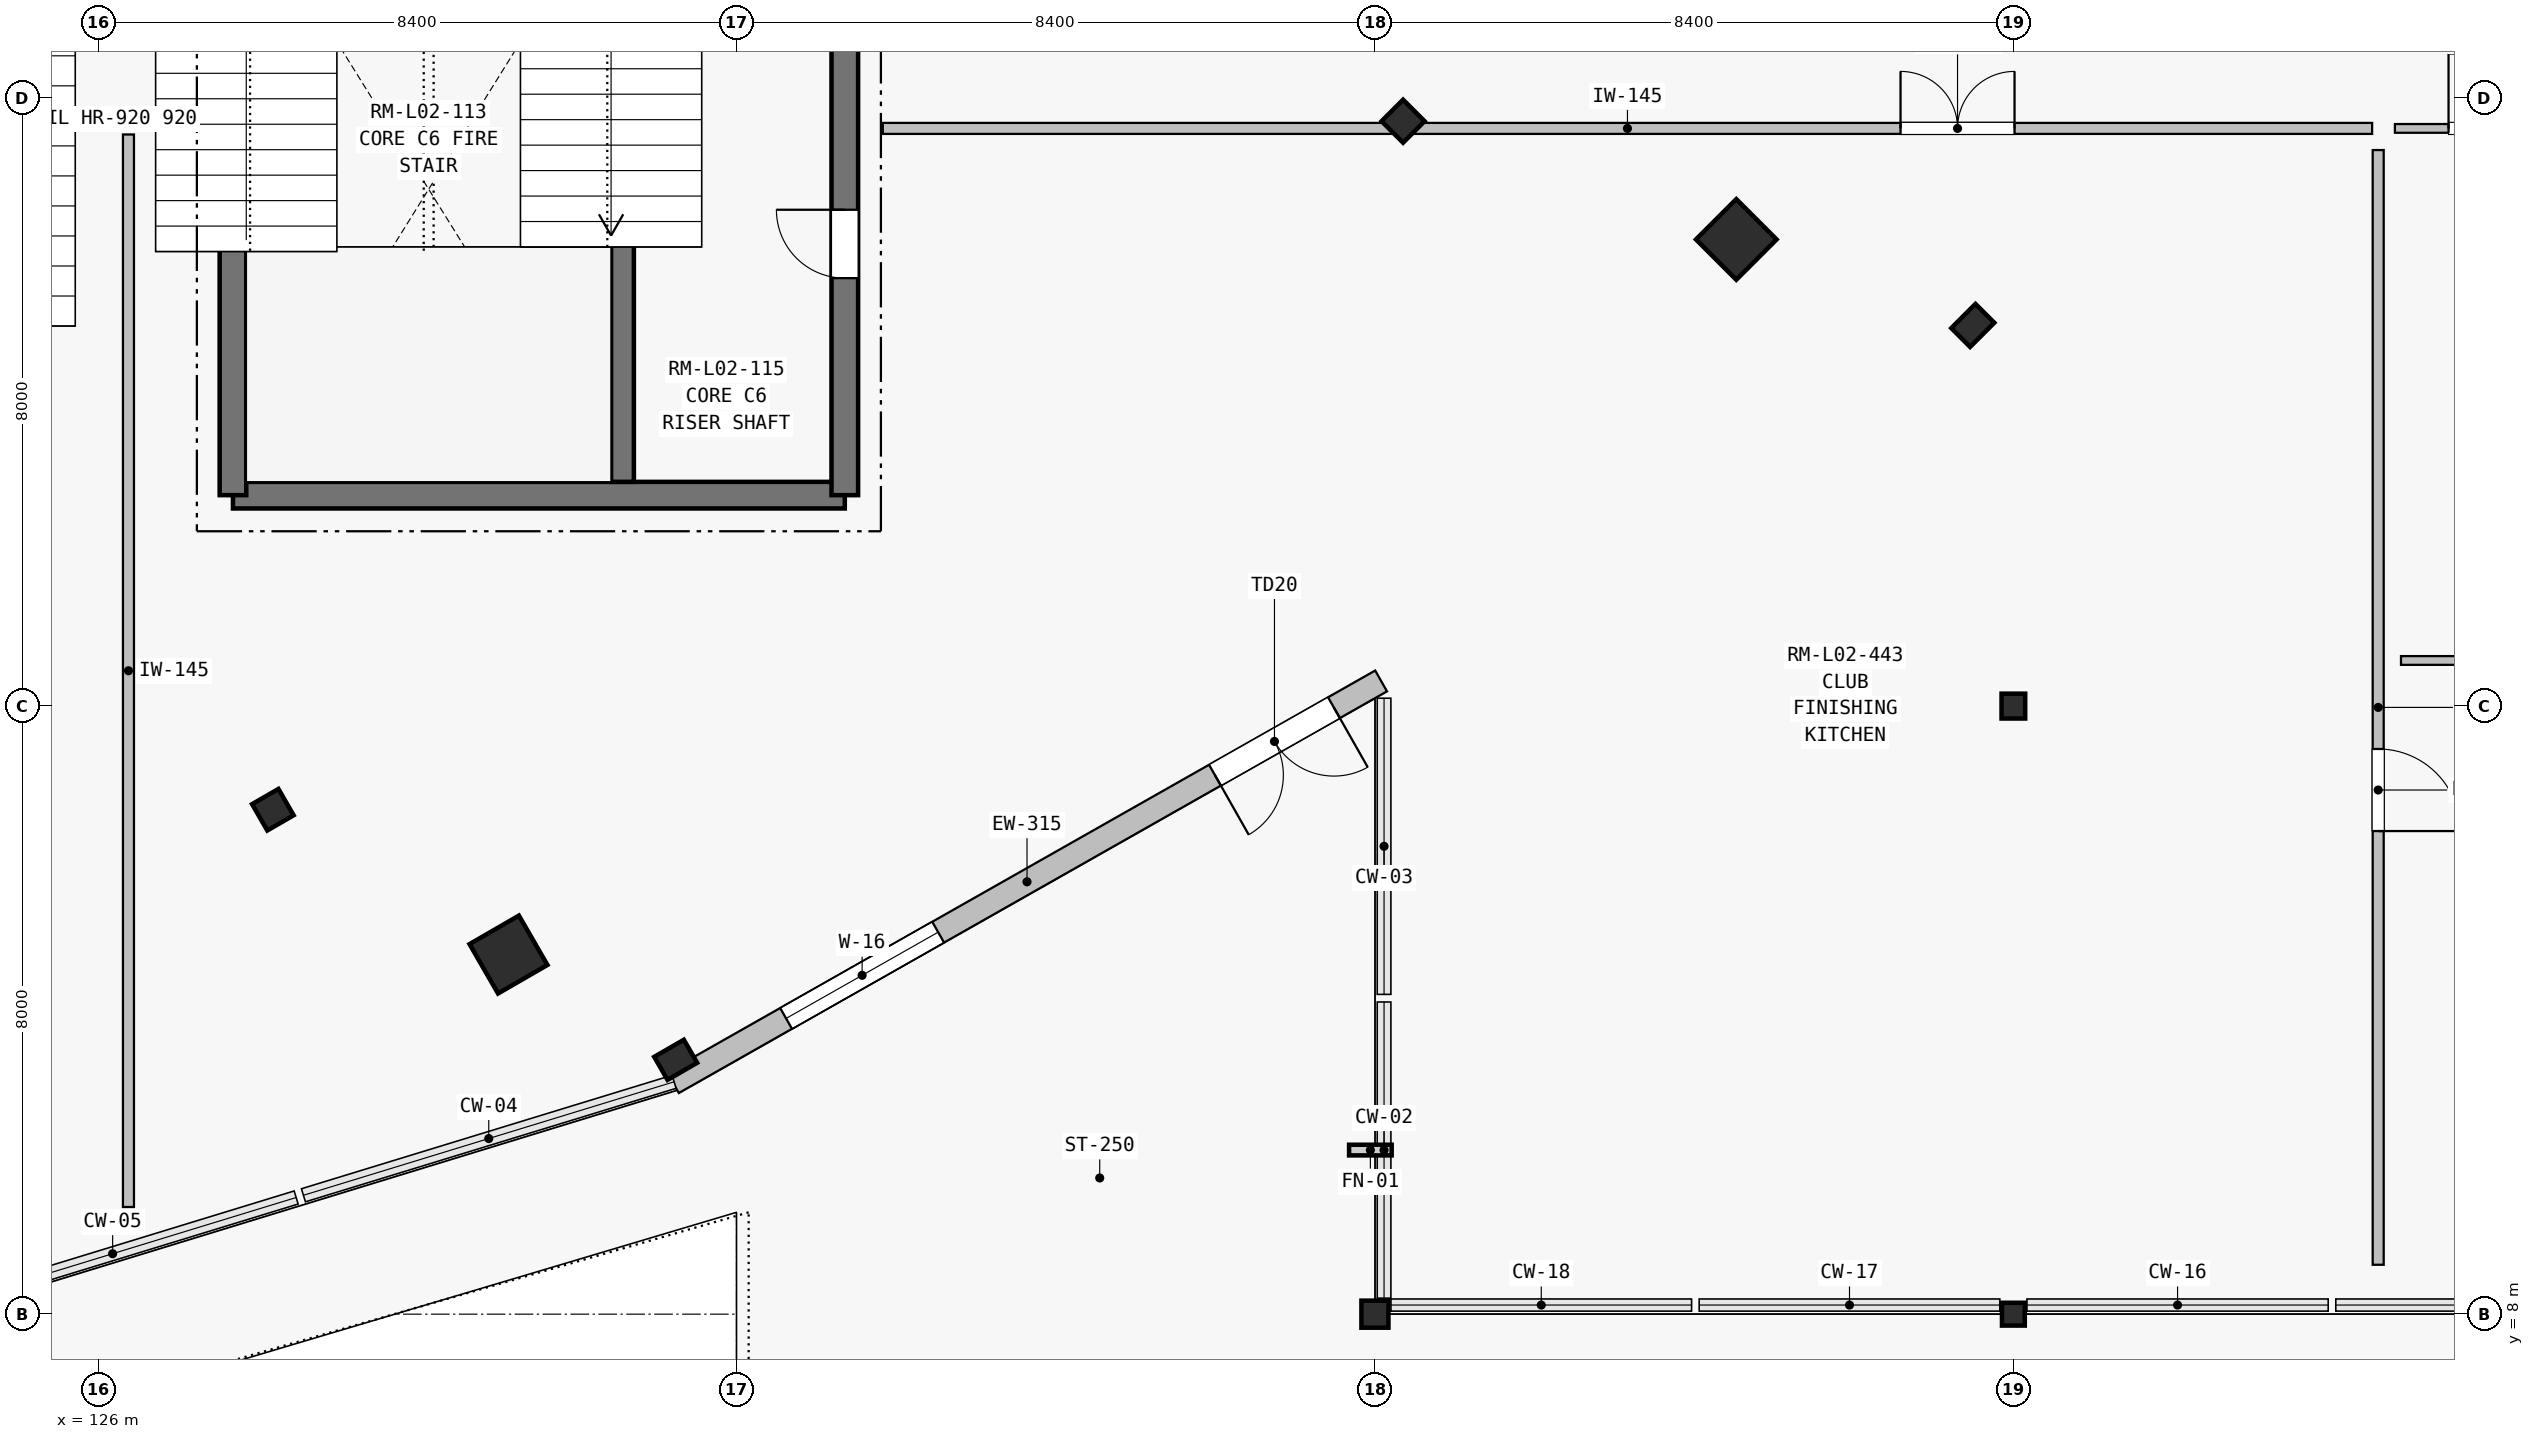
"""IFC4 building model, lengths in metres.
Left out: names, types, materials, properties, quantities, classifications, styles, units other than length and angle.
Written with IfcOpenShell. Run it as: python <this file> out.ifc"""

import sys

from ifc_helpers import new_model, si_unit, direction, frame, frame_2d, origin, origin_2d, place, context, subcontext, project, spatial, rectangle, hollow_rectangle, hollow_circle, i_section, extrude, element, fill, save


model = new_model("IFC4")
c1 = context("Model", 3, precision=1e-05, world=origin(), true_north=direction((0.0, 1.0)))
c2 = subcontext(c1, "Body", "Model", "MODEL_VIEW")
j1 = project(units=[si_unit("LENGTHUNIT", "METRE"), si_unit("PLANEANGLEUNIT", "RADIAN")], contexts=[c1])
p1 = place(None, origin())
s1 = spatial("IfcSite", under=j1, at=p1, CompositionType="ELEMENT")
p2 = place(p1, origin())
s2 = spatial("IfcBuilding", under=s1, at=p2, CompositionType="ELEMENT")
p3 = place(p2, frame((0.0, 0.0, 9.9)))
s3 = spatial("IfcBuildingStorey", under=s2, at=p3, CompositionType="ELEMENT", Elevation=9.9)
for number, where, z_axis, x_axis in (
    (1, (128.3, 14.637, 0.0), (0.0, 0.0, 1.0), (0.5, -0.866, 0.0)),
    (2, (143.17, 23.695, 0.0), (0.0, 0.0, 1.0), (0.707, -0.707, 0.0)),
):
    element("IfcColumn", number, at=place(p3, frame(where, z_axis=z_axis, x_axis=x_axis)), inside=s3, PredefinedType="COLUMN", context=c2, shape_type="SweptSolid", body=[
        extrude(i_section(OverallWidth=0.4, OverallDepth=0.4, WebThickness=0.016, FlangeThickness=0.028, at=origin_2d()), origin(), (0.0, 0.0, 1.0), 4.5),
    ])
for number, where, z_axis, x_axis in (
    (3, (131.4, 12.731, 0.0), (0.0, 0.0, 1.0), (0.5, -0.866, 0.0)),
    (4, (147.554, 22.139, 0.0), (0.0, 0.0, 1.0), (0.707, -0.707, 0.0)),
):
    element("IfcColumn", number, at=place(p3, frame(where, z_axis=z_axis, x_axis=x_axis)), inside=s3, PredefinedType="COLUMN", context=c2, shape_type="SweptSolid", body=[
        extrude(rectangle(XDim=0.75, YDim=0.75, at=origin_2d()), origin(), (0.0, 0.0, 1.0), 4.5),
    ])
p4 = place(p3, frame((142.8, 8.0, 0.0), z_axis=(0.0, 0.0, 1.0), x_axis=(1.0, 0.0, 0.0)))
e5 = element("IfcColumn", 5, at=p4, inside=s3, PredefinedType="COLUMN", context=c2, shape_type="SweptSolid", body=[
    extrude(hollow_circle(Radius=0.178, WallThickness=0.013, at=origin_2d()), origin(), (0.0, 0.0, 1.0), 4.26),
])
p5 = place(p3, frame((151.2, 8.0, 0.0), z_axis=(0.0, 0.0, 1.0), x_axis=(1.0, 0.0, 0.0)))
e6 = element("IfcColumn", 6, at=p5, inside=s3, PredefinedType="COLUMN", context=c2, shape_type="SweptSolid", body=[
    extrude(hollow_rectangle(XDim=0.3, YDim=0.3, WallThickness=0.012, at=origin_2d()), origin(), (0.0, 0.0, 1.0), 4.26),
])
p6 = place(p3, frame((151.2, 16.0, 0.0), z_axis=(0.0, 0.0, 1.0), x_axis=(1.0, 0.0, 0.0)))
e7 = element("IfcColumn", 7, at=p6, inside=s3, PredefinedType="COLUMN", context=c2, shape_type="SweptSolid", body=[
    extrude(i_section(OverallWidth=0.311, OverallDepth=0.327, WebThickness=0.016, FlangeThickness=0.025, at=origin_2d()), origin(), (0.0, 0.0, 1.0), 4.26),
])
for number, where, z_axis, x_axis in (
    (8, (133.6, 11.346, 0.0), (0.0, 0.0, 1.0), (0.5, -0.866, 0.0)),
    (9, (150.666, 21.008, 0.0), (0.0, 0.0, 1.0), (0.707, -0.707, 0.0)),
):
    element("IfcColumn", number, at=place(p3, frame(where, z_axis=z_axis, x_axis=x_axis)), inside=s3, PredefinedType="PILASTER", context=c2, shape_type="SweptSolid", body=[
        extrude(rectangle(XDim=0.35, YDim=0.45, at=origin_2d()), origin(), (0.0, 0.0, 1.0), 5.45),
    ])
p7 = place(p3, frame((142.881, 16.331, 0.0), z_axis=(0.0, 0.0, 1.0), x_axis=(-0.869834750278, -0.493343194144, 0.0)))
e10 = element("IfcWall", 10, at=p7, inside=s3, PredefinedType="SOLIDWALL", context=c2, shape_type="SweptSolid", body=[
    extrude(rectangle(XDim=10.712, YDim=0.315, at=frame_2d((5.356, 0.0))), origin(), (0.0, 0.0, 1.0), 4.26),
])
p8 = place(p7, frame((0.713, 0.0, 0.0)))
e11 = element("IfcOpeningElement", 11, at=p8, cuts=e10, PredefinedType="OPENING", context=c2, shape_type="SweptSolid", body=[
    extrude(rectangle(XDim=1.8, YDim=2.35, at=frame_2d((0.9, 1.175))), frame((0.0, 0.167, 0.0), z_axis=(0.0, -1.0, 0.0), x_axis=(1.0, 0.0, 0.0)), (0.0, 0.0, 1.0), 0.335),
])
p9 = place(p7, frame((6.7, 0.0, 0.9)))
e12 = element("IfcOpeningElement", 12, at=p9, cuts=e10, PredefinedType="OPENING", context=c2, shape_type="SweptSolid", body=[
    extrude(rectangle(XDim=2.3, YDim=1.3, at=frame_2d((1.15, 0.65))), frame((0.0, 0.167, 0.0), z_axis=(0.0, -1.0, 0.0), x_axis=(1.0, 0.0, 0.0)), (0.0, 0.0, 1.0), 0.335),
])
p10 = place(p3, frame((127.775, 18.775, 0.0), z_axis=(0.0, 0.0, 1.0), x_axis=(1.0, 0.0, 0.0)))
e13 = element("IfcWall", 13, at=p10, inside=s3, PredefinedType="SHEAR", context=c2, shape_type="SweptSolid", body=[
    extrude(rectangle(XDim=8.05, YDim=0.35, at=frame_2d((4.025, 0.0))), origin(), (0.0, 0.0, 1.0), 4.5),
])
p11 = place(p3, frame((127.775, 18.775, 0.0), z_axis=(0.0, 0.0, 1.0), x_axis=(0.0, 1.0, 0.0)))
e14 = element("IfcWall", 14, at=p11, inside=s3, PredefinedType="SHEAR", context=c2, shape_type="SweptSolid", body=[
    extrude(rectangle(XDim=14.85, YDim=0.35, at=frame_2d((7.425, 0.0))), origin(), (0.0, 0.0, 1.0), 4.5),
])
p12 = place(p3, frame((135.825, 18.775, 0.0), z_axis=(0.0, 0.0, 1.0), x_axis=(0.0, 1.0, 0.0)))
e15 = element("IfcWall", 15, at=p12, inside=s3, PredefinedType="SHEAR", context=c2, shape_type="SweptSolid", body=[
    extrude(rectangle(XDim=14.85, YDim=0.35, at=frame_2d((7.425, 0.0))), origin(), (0.0, 0.0, 1.0), 4.5),
])
p13 = place(p12, frame((2.855, 0.0, 0.0)))
e16 = element("IfcOpeningElement", 16, at=p13, cuts=e15, PredefinedType="OPENING", context=c2, shape_type="SweptSolid", body=[
    extrude(rectangle(XDim=0.9, YDim=2.1, at=frame_2d((0.45, 1.05))), frame((0.0, 0.185, 0.0), z_axis=(0.0, -1.0, 0.0), x_axis=(1.0, 0.0, 0.0)), (0.0, 0.0, 1.0), 0.37),
])
p14 = place(p3, frame((132.9, 18.95, 0.0), z_axis=(0.0, 0.0, 1.0), x_axis=(0.0, 1.0, 0.0)))
e17 = element("IfcWall", 17, at=p14, inside=s3, PredefinedType="SHEAR", context=c2, shape_type="SweptSolid", body=[
    extrude(rectangle(XDim=10.35, YDim=0.3, at=frame_2d((5.175, 0.0))), origin(), (0.0, 0.0, 1.0), 4.5),
])
p15 = place(p3, frame((136.325, 23.6, 0.0), z_axis=(0.0, 0.0, 1.0), x_axis=(1.0, 0.0, 0.0)))
e18 = element("IfcWall", 18, at=p15, inside=s3, PredefinedType="PARTITIONING", context=c2, shape_type="SweptSolid", body=[
    extrude(rectangle(XDim=19.595, YDim=0.145, at=frame_2d((9.797, 0.0))), origin(), (0.0, 0.0, 1.0), 3.245),
])
p16 = place(p15, frame((13.39, 0.0, 0.0)))
e19 = element("IfcOpeningElement", 19, at=p16, cuts=e18, PredefinedType="OPENING", context=c2, shape_type="SweptSolid", body=[
    extrude(rectangle(XDim=1.5, YDim=2.2, at=frame_2d((0.75, 1.1))), frame((0.0, 0.083, 0.0), z_axis=(0.0, -1.0, 0.0), x_axis=(1.0, 0.0, 0.0)), (0.0, 0.0, 1.0), 0.165),
])
p17 = place(p3, frame((156.0, 23.315, 0.0), z_axis=(0.0, 0.0, 1.0), x_axis=(0.0, -1.0, 0.0)))
e20 = element("IfcWall", 20, at=p17, inside=s3, PredefinedType="PARTITIONING", context=c2, shape_type="SweptSolid", body=[
    extrude(rectangle(XDim=14.665, YDim=0.145, at=frame_2d((7.333, 0.0))), origin(), (0.0, 0.0, 1.0), 3.325),
])
p18 = place(p17, frame((7.879, 0.0, 0.0)))
e21 = element("IfcOpeningElement", 21, at=p18, cuts=e20, PredefinedType="OPENING", context=c2, shape_type="SweptSolid", body=[
    extrude(rectangle(XDim=1.08, YDim=2.15, at=frame_2d((0.54, 1.075))), frame((0.0, 0.083, 0.0), z_axis=(0.0, -1.0, 0.0), x_axis=(1.0, 0.0, 0.0)), (0.0, 0.0, 1.0), 0.165),
])
p19 = place(p3, frame((126.4, 9.41, 0.0), z_axis=(0.0, 0.0, 1.0), x_axis=(0.0, 1.0, 0.0)))
e22 = element("IfcWall", 22, at=p19, inside=s3, PredefinedType="PARTITIONING", context=c2, shape_type="SweptSolid", body=[
    extrude(rectangle(XDim=14.11, YDim=0.145, at=frame_2d((7.055, 0.0))), origin(), (0.0, 0.0, 1.0), 3.245),
])
p20 = place(p3, frame((156.3, 16.6, 0.0), z_axis=(0.0, 0.0, 1.0), x_axis=(1.0, 0.0, 0.0)))
e23 = element("IfcWall", 23, at=p20, inside=s3, PredefinedType="PARTITIONING", context=c2, shape_type="SweptSolid", body=[
    extrude(rectangle(XDim=2.975, YDim=0.115, at=frame_2d((1.487, 0.0))), origin(), (0.0, 0.0, 1.0), 4.26),
])
p21 = place(p3, frame((156.22, 23.6, 0.0), z_axis=(0.0, 0.0, 1.0), x_axis=(1.0, 0.0, 0.0)))
e24 = element("IfcWall", 24, at=p21, inside=s3, PredefinedType="PARTITIONING", context=c2, shape_type="SweptSolid", body=[
    extrude(rectangle(XDim=3.055, YDim=0.115, at=frame_2d((1.527, 0.0))), origin(), (0.0, 0.0, 1.0), 4.26),
])
p22 = place(p21, frame((0.706, 0.0, 0.0)))
e25 = element("IfcOpeningElement", 25, at=p22, cuts=e24, PredefinedType="OPENING", context=c2, shape_type="SweptSolid", body=[
    extrude(rectangle(XDim=0.98, YDim=2.15, at=frame_2d((0.49, 1.075))), frame((0.0, 0.067, 0.0), z_axis=(0.0, -1.0, 0.0), x_axis=(1.0, 0.0, 0.0)), (0.0, 0.0, 1.0), 0.135),
])
p23 = place(p8, origin())
e26 = element("IfcDoor", 26, at=p23, inside=s3, OperationType="DOUBLE_DOOR_SINGLE_SWING", PredefinedType="DOOR", context=c2, shape_type="SweptSolid", body=[
    extrude(rectangle(XDim=1.8, YDim=2.35, at=frame_2d((0.9, 1.175))), frame((0.0, 0.025, 0.0), z_axis=(0.0, -1.0, 0.0), x_axis=(1.0, 0.0, 0.0)), (0.0, 0.0, 1.0), 0.05),
])
fill(e11, e26)
p24 = place(p9, origin())
e27 = element("IfcWindow", 27, at=p24, inside=s3, PartitioningType="SINGLE_PANEL", PredefinedType="WINDOW", context=c2, shape_type="SweptSolid", body=[
    extrude(rectangle(XDim=2.3, YDim=1.3, at=frame_2d((1.15, 0.65))), frame((0.0, 0.03, 0.0), z_axis=(0.0, -1.0, 0.0), x_axis=(1.0, 0.0, 0.0)), (0.0, 0.0, 1.0), 0.06),
])
fill(e12, e27)
p25 = place(p13, origin())
e28 = element("IfcDoor", 28, at=p25, inside=s3, OperationType="SINGLE_SWING_RIGHT", PredefinedType="DOOR", context=c2, shape_type="SweptSolid", body=[
    extrude(rectangle(XDim=0.9, YDim=2.1, at=frame_2d((0.45, 1.05))), frame((0.0, 0.025, 0.0), z_axis=(0.0, -1.0, 0.0), x_axis=(1.0, 0.0, 0.0)), (0.0, 0.0, 1.0), 0.05),
])
fill(e16, e28)
p26 = place(p16, origin())
e29 = element("IfcDoor", 29, at=p26, inside=s3, OperationType="DOUBLE_DOOR_SINGLE_SWING", PredefinedType="DOOR", context=c2, shape_type="SweptSolid", body=[
    extrude(rectangle(XDim=1.5, YDim=2.2, at=frame_2d((0.75, 1.1))), frame((0.0, 0.025, 0.0), z_axis=(0.0, -1.0, 0.0), x_axis=(1.0, 0.0, 0.0)), (0.0, 0.0, 1.0), 0.05),
])
fill(e19, e29)
p27 = place(p18, origin())
e30 = element("IfcDoor", 30, at=p27, inside=s3, OperationType="SINGLE_SWING_RIGHT", PredefinedType="DOOR", context=c2, shape_type="SweptSolid", body=[
    extrude(rectangle(XDim=1.08, YDim=2.15, at=frame_2d((0.54, 1.075))), frame((0.0, 0.025, 0.0), z_axis=(0.0, -1.0, 0.0), x_axis=(1.0, 0.0, 0.0)), (0.0, 0.0, 1.0), 0.05),
])
fill(e21, e30)
p28 = place(p22, origin())
e31 = element("IfcDoor", 31, at=p28, inside=s3, OperationType="SINGLE_SWING_LEFT", PredefinedType="DOOR", context=c2, shape_type="SweptSolid", body=[
    extrude(rectangle(XDim=0.98, YDim=2.15, at=frame_2d((0.49, 1.075))), frame((0.0, 0.025, 0.0), z_axis=(0.0, -1.0, 0.0), x_axis=(1.0, 0.0, 0.0)), (0.0, 0.0, 1.0), 0.05),
])
fill(e25, e31)
save(model, sys.argv[1])
